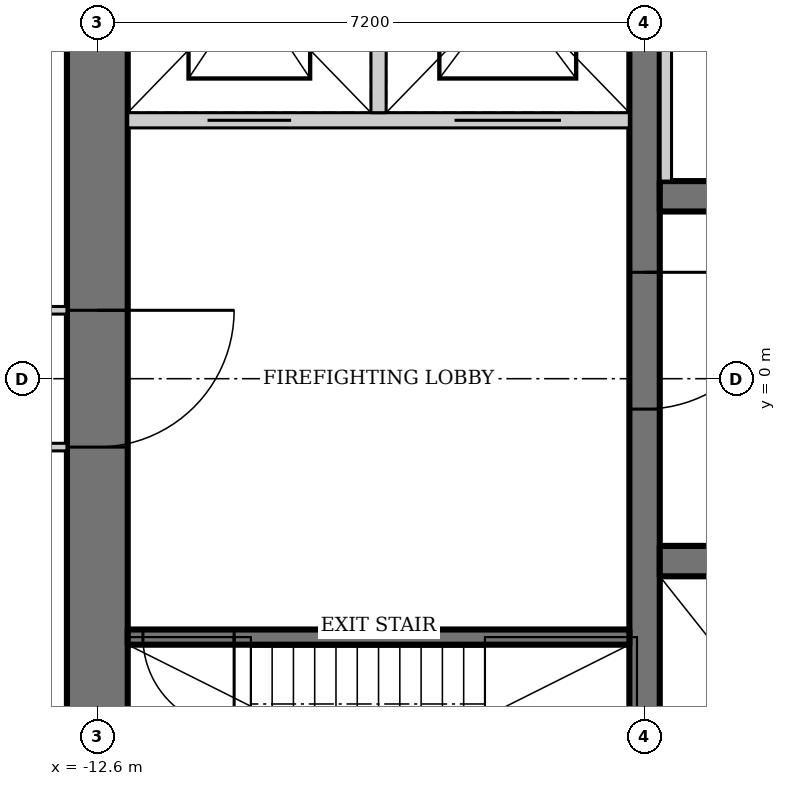
"""IFC4 building model, lengths in metres.
Left out: names, types, materials, properties, quantities, classifications, styles, units other than length and angle.
Written with IfcOpenShell. Run it as: python <this file> out.ifc"""

import sys

from ifc_helpers import new_model, si_unit, direction, frame, frame_2d, origin, place, context, subcontext, project, spatial, rectangle, extrude, element, fill, save


model = new_model("IFC4")
c1 = context("Model", 3, precision=1e-05, world=origin(), true_north=direction((0.0, 1.0)))
c2 = subcontext(c1, "Body", "Model", "MODEL_VIEW")
j1 = project(units=[si_unit("LENGTHUNIT", "METRE"), si_unit("PLANEANGLEUNIT", "RADIAN")], contexts=[c1])
p1 = place(None, origin())
s1 = spatial("IfcSite", under=j1, at=p1, CompositionType="ELEMENT")
p2 = place(p1, origin())
s2 = spatial("IfcBuilding", under=s1, at=p2, CompositionType="ELEMENT")
p3 = place(p2, frame((0.0, 0.0, 228.4)))
s3 = spatial("IfcBuildingStorey", under=s2, at=p3, CompositionType="ELEMENT", Elevation=228.4)
p4 = place(p3, frame((-12.6, 13.0, 0.0), z_axis=(0.0, 0.0, 1.0), x_axis=(0.0, -1.0, 0.0)))
e1 = element("IfcWall", 1, at=p4, inside=s3, PredefinedType="SHEAR", context=c2, shape_type="SweptSolid", body=[
    extrude(rectangle(XDim=26.0, YDim=0.8, at=frame_2d((13.0, 0.0))), origin(), (0.0, 0.0, 1.0), 4.2),
])
p5 = place(p4, frame((12.1, 0.0, 0.0)))
e2 = element("IfcOpeningElement", 2, at=p5, cuts=e1, PredefinedType="OPENING", context=c2, shape_type="SweptSolid", body=[
    extrude(rectangle(XDim=1.8, YDim=2.1, at=frame_2d((0.9, 1.05))), frame((0.0, 0.41, 0.0), z_axis=(0.0, -1.0, 0.0), x_axis=(1.0, 0.0, 0.0)), (0.0, 0.0, 1.0), 0.82),
])
p6 = place(p3, frame((-5.4, 7.8, 0.0), z_axis=(0.0, 0.0, 1.0), x_axis=(0.0, -1.0, 0.0)))
e3 = element("IfcWall", 3, at=p6, inside=s3, PredefinedType="SHEAR", context=c2, shape_type="SweptSolid", body=[
    extrude(rectangle(XDim=14.6, YDim=0.4, at=frame_2d((7.3, 0.0))), origin(), (0.0, 0.0, 1.0), 4.2),
])
p7 = place(p6, frame((6.4, 0.0, 0.0)))
e4 = element("IfcOpeningElement", 4, at=p7, cuts=e3, PredefinedType="OPENING", context=c2, shape_type="SweptSolid", body=[
    extrude(rectangle(XDim=1.8, YDim=2.1, at=frame_2d((0.9, 1.05))), frame((0.0, 0.21, 0.0), z_axis=(0.0, -1.0, 0.0), x_axis=(1.0, 0.0, 0.0)), (0.0, 0.0, 1.0), 0.42),
])
p8 = place(p3, frame((-5.2, -2.4, 0.0), z_axis=(0.0, 0.0, 1.0), x_axis=(1.0, 0.0, 0.0)))
e5 = element("IfcWall", 5, at=p8, inside=s3, PredefinedType="SHEAR", context=c2, shape_type="SweptSolid", body=[
    extrude(rectangle(XDim=10.4, YDim=0.4, at=frame_2d((5.2, 0.0))), origin(), (0.0, 0.0, 1.0), 4.2),
])
p9 = place(p8, frame((1.683, 0.0, 0.0)))
e6 = element("IfcOpeningElement", 6, at=p9, cuts=e5, PredefinedType="OPENING", context=c2, shape_type="SweptSolid", body=[
    extrude(rectangle(XDim=1.1, YDim=2.2, at=frame_2d((0.55, 1.1))), frame((0.0, 0.21, 0.0), z_axis=(0.0, -1.0, 0.0), x_axis=(1.0, 0.0, 0.0)), (0.0, 0.0, 1.0), 0.42),
])
p10 = place(p8, frame((5.217, 0.0, 0.0)))
e7 = element("IfcOpeningElement", 7, at=p10, cuts=e5, PredefinedType="OPENING", context=c2, shape_type="SweptSolid", body=[
    extrude(rectangle(XDim=1.1, YDim=2.2, at=frame_2d((0.55, 1.1))), frame((0.0, 0.21, 0.0), z_axis=(0.0, -1.0, 0.0), x_axis=(1.0, 0.0, 0.0)), (0.0, 0.0, 1.0), 0.42),
])
p11 = place(p8, frame((8.75, 0.0, 0.0)))
e8 = element("IfcOpeningElement", 8, at=p11, cuts=e5, PredefinedType="OPENING", context=c2, shape_type="SweptSolid", body=[
    extrude(rectangle(XDim=1.1, YDim=2.2, at=frame_2d((0.55, 1.1))), frame((0.0, 0.21, 0.0), z_axis=(0.0, -1.0, 0.0), x_axis=(1.0, 0.0, 0.0)), (0.0, 0.0, 1.0), 0.42),
])
p12 = place(p3, frame((5.2, 2.4, 0.0), z_axis=(0.0, 0.0, 1.0), x_axis=(-1.0, 0.0, 0.0)))
e9 = element("IfcWall", 9, at=p12, inside=s3, PredefinedType="SHEAR", context=c2, shape_type="SweptSolid", body=[
    extrude(rectangle(XDim=10.4, YDim=0.4, at=frame_2d((5.2, 0.0))), origin(), (0.0, 0.0, 1.0), 4.2),
])
p13 = place(p3, frame((-5.6, -3.4, 0.0), z_axis=(0.0, 0.0, 1.0), x_axis=(-1.0, 0.0, 0.0)))
e10 = element("IfcWall", 10, at=p13, inside=s3, PredefinedType="SHEAR", context=c2, shape_type="SweptSolid", body=[
    extrude(rectangle(XDim=6.6, YDim=0.2, at=frame_2d((3.3, 0.0))), origin(), (0.0, 0.0, 1.0), 4.2),
])
p14 = place(p13, frame((5.2, 0.0, 0.0)))
e11 = element("IfcOpeningElement", 11, at=p14, cuts=e10, PredefinedType="OPENING", context=c2, shape_type="SweptSolid", body=[
    extrude(rectangle(XDim=1.2, YDim=2.1, at=frame_2d((0.6, 1.05))), frame((0.0, 0.11, 0.0), z_axis=(0.0, -1.0, 0.0), x_axis=(1.0, 0.0, 0.0)), (0.0, 0.0, 1.0), 0.22),
])
p15 = place(p3, frame((-12.2, 3.4, 0.0), z_axis=(0.0, 0.0, 1.0), x_axis=(1.0, 0.0, 0.0)))
e12 = element("IfcWall", 12, at=p15, inside=s3, PredefinedType="SOLIDWALL", context=c2, shape_type="SweptSolid", body=[
    extrude(rectangle(XDim=6.6, YDim=0.2, at=frame_2d((3.3, 0.0))), origin(), (0.0, 0.0, 1.0), 4.2),
])
p16 = place(p15, frame((1.05, 0.0, 0.0)))
e13 = element("IfcOpeningElement", 13, at=p16, cuts=e12, PredefinedType="OPENING", context=c2, shape_type="SweptSolid", body=[
    extrude(rectangle(XDim=1.1, YDim=2.2, at=frame_2d((0.55, 1.1))), frame((0.0, 0.11, 0.0), z_axis=(0.0, -1.0, 0.0), x_axis=(1.0, 0.0, 0.0)), (0.0, 0.0, 1.0), 0.22),
])
p17 = place(p15, frame((4.3, 0.0, 0.0)))
e14 = element("IfcOpeningElement", 14, at=p17, cuts=e12, PredefinedType="OPENING", context=c2, shape_type="SweptSolid", body=[
    extrude(rectangle(XDim=1.4, YDim=2.2, at=frame_2d((0.7, 1.1))), frame((0.0, 0.11, 0.0), z_axis=(0.0, -1.0, 0.0), x_axis=(1.0, 0.0, 0.0)), (0.0, 0.0, 1.0), 0.22),
])
p18 = place(p3, frame((-8.9, 3.5, 0.0), z_axis=(0.0, 0.0, 1.0), x_axis=(0.0, 1.0, 0.0)))
e15 = element("IfcWall", 15, at=p18, inside=s3, PredefinedType="SOLIDWALL", context=c2, shape_type="SweptSolid", body=[
    extrude(rectangle(XDim=3.3, YDim=0.2, at=frame_2d((1.65, 0.0))), origin(), (0.0, 0.0, 1.0), 4.2),
])
p19 = place(p3, frame((-5.12, 2.6, 0.0), z_axis=(0.0, 0.0, 1.0), x_axis=(0.0, 1.0, 0.0)))
e16 = element("IfcWall", 16, at=p19, inside=s3, PredefinedType="SOLIDWALL", context=c2, shape_type="SweptSolid", body=[
    extrude(rectangle(XDim=4.4, YDim=0.15, at=frame_2d((2.2, 0.0))), origin(), (0.0, 0.0, 1.0), 4.05),
])
p20 = place(p3, frame((-15.165, -0.9, 0.0), z_axis=(0.0, 0.0, 1.0), x_axis=(1.0, 0.0, 0.0)))
e17 = element("IfcWall", 17, at=p20, inside=s3, PredefinedType="PARTITIONING", context=c2, shape_type="SweptSolid", body=[
    extrude(rectangle(XDim=2.165, YDim=0.1, at=frame_2d((1.083, 0.0))), origin(), (0.0, 0.0, 1.0), 4.05),
])
p21 = place(p20, frame((0.1, 0.0, 0.0)))
e18 = element("IfcOpeningElement", 18, at=p21, cuts=e17, PredefinedType="OPENING", context=c2, shape_type="SweptSolid", body=[
    extrude(rectangle(XDim=0.9, YDim=2.1, at=frame_2d((0.45, 1.05))), frame((0.0, 0.06, 0.0), z_axis=(0.0, -1.0, 0.0), x_axis=(1.0, 0.0, 0.0)), (0.0, 0.0, 1.0), 0.12),
])
p22 = place(p3, frame((-13.0, 0.9, 0.0), z_axis=(0.0, 0.0, 1.0), x_axis=(-1.0, 0.0, 0.0)))
e19 = element("IfcWall", 19, at=p22, inside=s3, PredefinedType="PARTITIONING", context=c2, shape_type="SweptSolid", body=[
    extrude(rectangle(XDim=2.165, YDim=0.1, at=frame_2d((1.083, 0.0))), origin(), (0.0, 0.0, 1.0), 4.05),
])
p23 = place(p22, frame((1.15, 0.0, 0.0)))
e20 = element("IfcOpeningElement", 20, at=p23, cuts=e19, PredefinedType="OPENING", context=c2, shape_type="SweptSolid", body=[
    extrude(rectangle(XDim=0.9, YDim=2.1, at=frame_2d((0.45, 1.05))), frame((0.0, 0.06, 0.0), z_axis=(0.0, -1.0, 0.0), x_axis=(1.0, 0.0, 0.0)), (0.0, 0.0, 1.0), 0.12),
])
p24 = place(p7, origin())
e21 = element("IfcDoor", 21, at=p24, inside=s3, OperationType="DOUBLE_DOOR_DOUBLE_SWING", PredefinedType="DOOR", context=c2, shape_type="SweptSolid", body=[
    extrude(rectangle(XDim=1.8, YDim=2.1, at=frame_2d((0.9, 1.05))), frame((0.0, 0.025, 0.0), z_axis=(0.0, -1.0, 0.0), x_axis=(1.0, 0.0, 0.0)), (0.0, 0.0, 1.0), 0.05),
])
fill(e4, e21)
p25 = place(p14, origin())
e22 = element("IfcDoor", 22, at=p25, inside=s3, OperationType="SINGLE_SWING_RIGHT", PredefinedType="DOOR", context=c2, shape_type="SweptSolid", body=[
    extrude(rectangle(XDim=1.2, YDim=2.1, at=frame_2d((0.6, 1.05))), frame((0.0, 0.025, 0.0), z_axis=(0.0, -1.0, 0.0), x_axis=(1.0, 0.0, 0.0)), (0.0, 0.0, 1.0), 0.05),
])
fill(e11, e22)
p26 = place(p5, origin())
e23 = element("IfcDoor", 23, at=p26, inside=s3, OperationType="DOUBLE_DOOR_DOUBLE_SWING", PredefinedType="DOOR", context=c2, shape_type="SweptSolid", body=[
    extrude(rectangle(XDim=1.8, YDim=2.1, at=frame_2d((0.9, 1.05))), frame((0.0, 0.025, 0.0), z_axis=(0.0, -1.0, 0.0), x_axis=(1.0, 0.0, 0.0)), (0.0, 0.0, 1.0), 0.05),
])
fill(e2, e23)
p27 = place(p16, origin())
e24 = element("IfcDoor", 24, at=p27, inside=s3, OperationType="DOUBLE_DOOR_SLIDING", PredefinedType="DOOR", context=c2, shape_type="SweptSolid", body=[
    extrude(rectangle(XDim=1.1, YDim=2.2, at=frame_2d((0.55, 1.1))), frame((0.0, 0.025, 0.0), z_axis=(0.0, -1.0, 0.0), x_axis=(1.0, 0.0, 0.0)), (0.0, 0.0, 1.0), 0.05),
])
fill(e13, e24)
p28 = place(p17, origin())
e25 = element("IfcDoor", 25, at=p28, inside=s3, OperationType="DOUBLE_DOOR_SLIDING", PredefinedType="DOOR", context=c2, shape_type="SweptSolid", body=[
    extrude(rectangle(XDim=1.4, YDim=2.2, at=frame_2d((0.7, 1.1))), frame((0.0, 0.025, 0.0), z_axis=(0.0, -1.0, 0.0), x_axis=(1.0, 0.0, 0.0)), (0.0, 0.0, 1.0), 0.05),
])
fill(e14, e25)
save(model, sys.argv[1])
